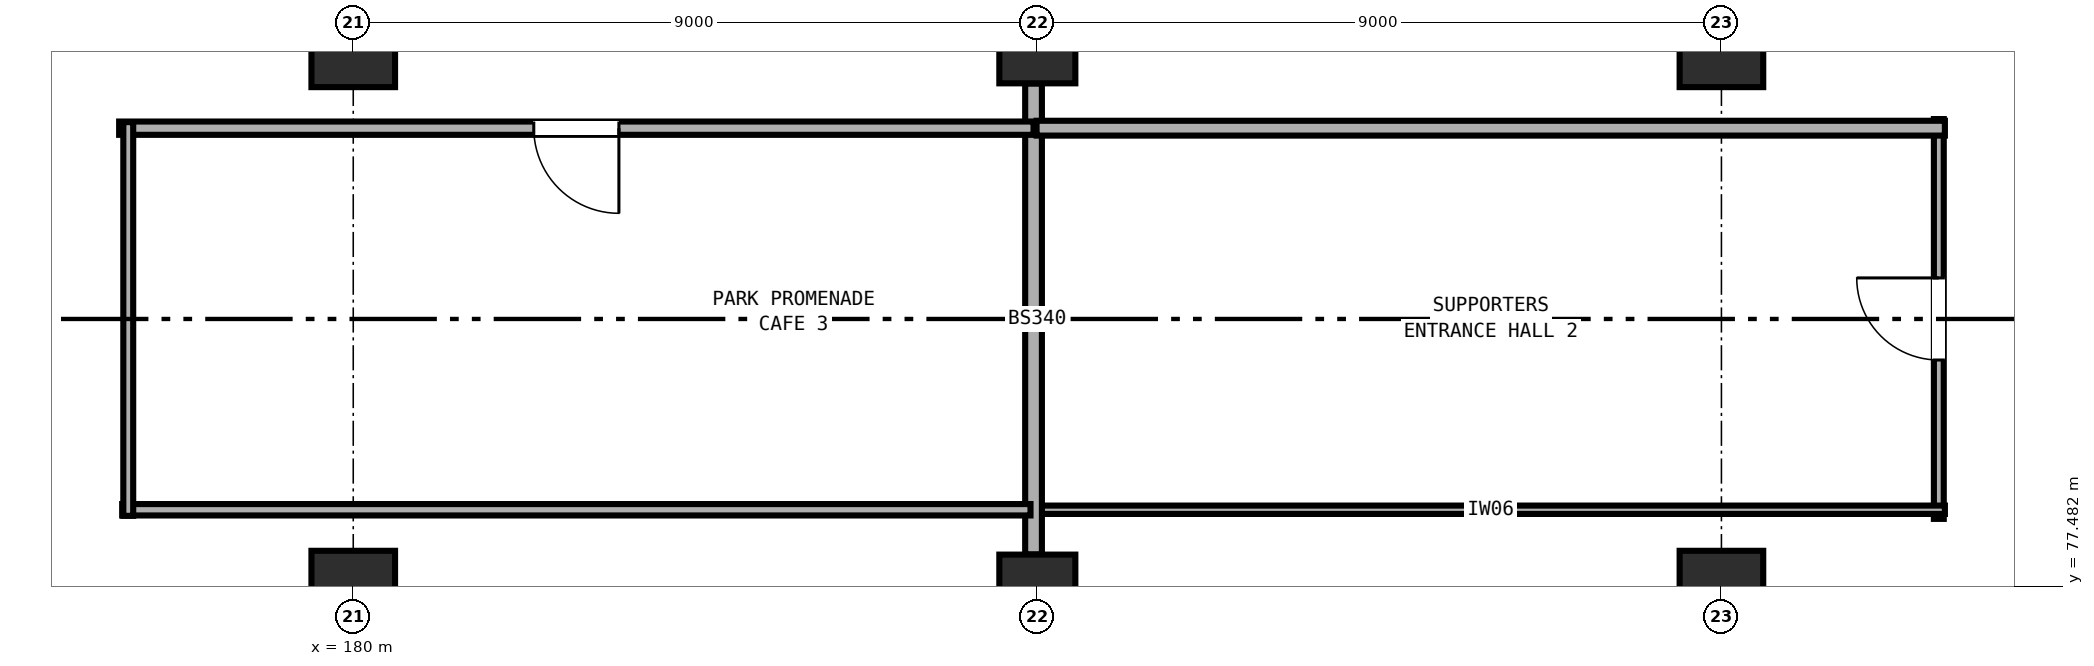
"""IFC4 building model, lengths in metres.
Left out: names, types, materials, properties, quantities, classifications, styles, units other than length and angle.
Written with IfcOpenShell. Run it as: python <this file> out.ifc"""

import sys

from ifc_helpers import new_model, si_unit, direction, frame, frame_2d, origin, origin_2d, place, context, subcontext, project, spatial, rectangle, extrude, element, fill, save


model = new_model("IFC4")
c1 = context("Model", 3, precision=1e-05, world=origin(), true_north=direction((0.0, 1.0)))
c2 = subcontext(c1, "Body", "Model", "MODEL_VIEW")
j1 = project(units=[si_unit("LENGTHUNIT", "METRE"), si_unit("PLANEANGLEUNIT", "RADIAN")], contexts=[c1])
p1 = place(None, origin())
s1 = spatial("IfcSite", under=j1, at=p1, CompositionType="ELEMENT")
p2 = place(p1, origin())
s2 = spatial("IfcBuilding", under=s1, at=p2, CompositionType="ELEMENT")
p3 = place(p2, origin())
s3 = spatial("IfcBuildingStorey", under=s2, at=p3, CompositionType="ELEMENT", Elevation=0.0)
for number, where, z_axis, x_axis in (
    (1, (180.0, 77.4, 0.0), (0.0, 0.0, 1.0), (1.0, 0.0, 0.0)),
    (2, (180.0, 84.6, 0.0), (0.0, 0.0, 1.0), (1.0, 0.0, 0.0)),
):
    element("IfcColumn", number, at=place(p3, frame(where, z_axis=z_axis, x_axis=x_axis)), inside=s3, PredefinedType="COLUMN", context=c2, shape_type="SweptSolid", body=[
        extrude(rectangle(XDim=1.1, YDim=1.1, at=origin_2d()), origin(), (0.0, 0.0, 1.0), 4.8),
    ])
for number, where, z_axis, x_axis in (
    (3, (189.0, 77.4, 0.0), (0.0, 0.0, 1.0), (1.0, 0.0, 0.0)),
    (4, (189.0, 84.6, 0.0), (0.0, 0.0, 1.0), (1.0, 0.0, 0.0)),
):
    element("IfcColumn", number, at=place(p3, frame(where, z_axis=z_axis, x_axis=x_axis)), inside=s3, PredefinedType="COLUMN", context=c2, shape_type="SweptSolid", body=[
        extrude(rectangle(XDim=1.0, YDim=1.0, at=origin_2d()), origin(), (0.0, 0.0, 1.0), 4.8),
    ])
for number, where, z_axis, x_axis in (
    (5, (198.0, 77.4, 0.0), (0.0, 0.0, 1.0), (1.0, 0.0, 0.0)),
    (6, (198.0, 84.6, 0.0), (0.0, 0.0, 1.0), (1.0, 0.0, 0.0)),
):
    element("IfcColumn", number, at=place(p3, frame(where, z_axis=z_axis, x_axis=x_axis)), inside=s3, PredefinedType="COLUMN", context=c2, shape_type="SweptSolid", body=[
        extrude(rectangle(XDim=1.1, YDim=1.1, at=origin_2d()), origin(), (0.0, 0.0, 1.0), 4.8),
    ])
p4 = place(p3, frame((200.86, 78.37, 0.0), z_axis=(0.0, 0.0, 1.0), x_axis=(0.0, 1.0, 0.0)))
e7 = element("IfcWall", 7, at=p4, inside=s3, PredefinedType="PARTITIONING", context=c2, shape_type="SweptSolid", body=[
    extrude(rectangle(XDim=5.26, YDim=0.13, at=frame_2d((2.63, 0.0))), origin(), (0.0, 0.0, 1.0), 3.28),
])
p5 = place(p4, frame((2.09, 0.0, 0.0)))
e8 = element("IfcOpeningElement", 8, at=p5, cuts=e7, PredefinedType="OPENING", context=c2, shape_type="SweptSolid", body=[
    extrude(rectangle(XDim=1.08, YDim=2.18, at=frame_2d((0.54, 1.09))), frame((0.0, 0.075, 0.0), z_axis=(0.0, -1.0, 0.0), x_axis=(1.0, 0.0, 0.0)), (0.0, 0.0, 1.0), 0.15),
])
p6 = place(p3, frame((200.94, 78.49, 0.0), z_axis=(0.0, 0.0, 1.0), x_axis=(-1.0, 0.0, 0.0)))
e9 = element("IfcWall", 9, at=p6, inside=s3, PredefinedType="PARTITIONING", context=c2, shape_type="SweptSolid", body=[
    extrude(rectangle(XDim=11.95, YDim=0.11, at=frame_2d((5.975, 0.0))), origin(), (0.0, 0.0, 1.0), 3.28),
])
p7 = place(p3, frame((188.95, 77.902, 0.0), z_axis=(0.0, 0.0, 1.0), x_axis=(0.0, 1.0, 0.0)))
e10 = element("IfcWall", 10, at=p7, inside=s3, PredefinedType="PARTITIONING", context=c2, shape_type="SweptSolid", body=[
    extrude(rectangle(XDim=6.196, YDim=0.22, at=frame_2d((3.098, 0.0))), origin(), (0.0, 0.0, 1.0), 3.28),
])
p8 = place(p3, frame((188.99, 83.51, 0.0), z_axis=(0.0, 0.0, 1.0), x_axis=(1.0, 0.0, 0.0)))
e11 = element("IfcWall", 11, at=p8, inside=s3, PredefinedType="PARTITIONING", context=c2, shape_type="SweptSolid", body=[
    extrude(rectangle(XDim=11.95, YDim=0.195, at=frame_2d((5.975, 0.0))), origin(), (0.0, 0.0, 1.0), 3.28),
])
p9 = place(p3, frame((188.95, 83.51, 0.0), z_axis=(0.0, 0.0, 1.0), x_axis=(-1.0, 0.0, 0.0)))
e12 = element("IfcWall", 12, at=p9, inside=s3, PredefinedType="PARTITIONING", context=c2, shape_type="SweptSolid", body=[
    extrude(rectangle(XDim=12.03, YDim=0.175, at=frame_2d((6.015, 0.0))), origin(), (0.0, 0.0, 1.0), 3.28),
])
p10 = place(p9, frame((5.455, 0.0, 0.0)))
e13 = element("IfcOpeningElement", 13, at=p10, cuts=e12, PredefinedType="OPENING", context=c2, shape_type="SweptSolid", body=[
    extrude(rectangle(XDim=1.12, YDim=2.22, at=frame_2d((0.56, 1.11))), frame((0.0, 0.097, 0.0), z_axis=(0.0, -1.0, 0.0), x_axis=(1.0, 0.0, 0.0)), (0.0, 0.0, 1.0), 0.195),
])
p11 = place(p3, frame((188.91, 78.49, 0.0), z_axis=(0.0, 0.0, 1.0), x_axis=(-1.0, 0.0, 0.0)))
e14 = element("IfcWall", 14, at=p11, inside=s3, PredefinedType="PARTITIONING", context=c2, shape_type="SweptSolid", body=[
    extrude(rectangle(XDim=11.95, YDim=0.15, at=frame_2d((5.975, 0.0))), origin(), (0.0, 0.0, 1.0), 3.28),
])
p12 = place(p3, frame((177.04, 78.41, 0.0), z_axis=(0.0, 0.0, 1.0), x_axis=(0.0, 1.0, 0.0)))
e15 = element("IfcWall", 15, at=p12, inside=s3, PredefinedType="PARTITIONING", context=c2, shape_type="SweptSolid", body=[
    extrude(rectangle(XDim=5.18, YDim=0.13, at=frame_2d((2.59, 0.0))), origin(), (0.0, 0.0, 1.0), 3.28),
])
p13 = place(p5, origin())
e16 = element("IfcDoor", 16, at=p13, inside=s3, OperationType="SINGLE_SWING_RIGHT", PredefinedType="DOOR", context=c2, shape_type="SweptSolid", body=[
    extrude(rectangle(XDim=1.08, YDim=2.18, at=frame_2d((0.54, 1.09))), frame((0.0, 0.025, 0.0), z_axis=(0.0, -1.0, 0.0), x_axis=(1.0, 0.0, 0.0)), (0.0, 0.0, 1.0), 0.05),
])
fill(e8, e16)
p14 = place(p10, origin())
e17 = element("IfcDoor", 17, at=p14, inside=s3, OperationType="SINGLE_SWING_LEFT", PredefinedType="DOOR", context=c2, shape_type="SweptSolid", body=[
    extrude(rectangle(XDim=1.12, YDim=2.22, at=frame_2d((0.56, 1.11))), frame((0.0, 0.025, 0.0), z_axis=(0.0, -1.0, 0.0), x_axis=(1.0, 0.0, 0.0)), (0.0, 0.0, 1.0), 0.05),
])
fill(e13, e17)
save(model, sys.argv[1])
